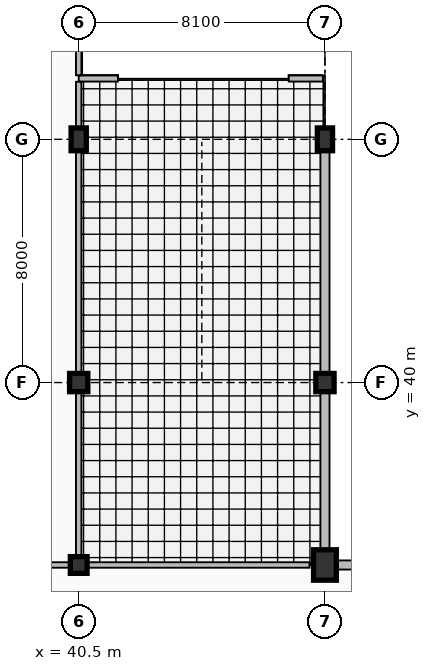
"""IFC4 building model, lengths in metres.
Left out: names, types, materials, properties, quantities, classifications, styles, units other than length and angle.
Written with IfcOpenShell. Run it as: python <this file> out.ifc"""

import sys

from ifc_helpers import new_model, si_unit, direction, frame, frame_2d, origin, origin_2d, place, context, subcontext, project, spatial, rectangle, extrude, element, fill, save


model = new_model("IFC4")
c1 = context("Model", 3, precision=1e-05, world=origin(), true_north=direction((0.0, 1.0)))
c2 = subcontext(c1, "Body", "Model", "MODEL_VIEW")
j1 = project(units=[si_unit("LENGTHUNIT", "METRE"), si_unit("PLANEANGLEUNIT", "RADIAN")], contexts=[c1])
p1 = place(None, origin())
s1 = spatial("IfcSite", under=j1, at=p1, CompositionType="ELEMENT")
p2 = place(p1, origin())
s2 = spatial("IfcBuilding", under=s1, at=p2, CompositionType="ELEMENT")
p3 = place(p2, frame((0.0, 0.0, 10.2)))
s3 = spatial("IfcBuildingStorey", under=s2, at=p3, CompositionType="ELEMENT", Elevation=10.2)
p4 = place(p3, frame((40.5, 34.0, 0.0), z_axis=(0.0, 0.0, 1.0), x_axis=(1.0, 0.0, 0.0)))
e1 = element("IfcColumn", 1, at=p4, inside=s3, PredefinedType="COLUMN", context=c2, shape_type="SweptSolid", body=[
    extrude(rectangle(XDim=0.55, YDim=0.55, at=origin_2d()), origin(), (0.0, 0.0, 1.0), 4.24),
])
p5 = place(p3, frame((40.5, 40.0, 0.0), z_axis=(0.0, 0.0, 1.0), x_axis=(1.0, 0.0, 0.0)))
e2 = element("IfcColumn", 2, at=p5, inside=s3, PredefinedType="COLUMN", context=c2, shape_type="SweptSolid", body=[
    extrude(rectangle(XDim=0.6, YDim=0.6, at=origin_2d()), origin(), (0.0, 0.0, 1.0), 4.5),
])
p6 = place(p3, frame((40.5, 48.0, 0.0), z_axis=(0.0, 0.0, 1.0), x_axis=(1.0, 0.0, 0.0)))
e3 = element("IfcColumn", 3, at=p6, inside=s3, PredefinedType="COLUMN", context=c2, shape_type="SweptSolid", body=[
    extrude(rectangle(XDim=0.5, YDim=0.75, at=origin_2d()), origin(), (0.0, 0.0, 1.0), 4.5),
])
p7 = place(p3, frame((48.6, 34.0, 0.0), z_axis=(0.0, 0.0, 1.0), x_axis=(1.0, 0.0, 0.0)))
e4 = element("IfcColumn", 4, at=p7, inside=s3, PredefinedType="COLUMN", context=c2, shape_type="SweptSolid", body=[
    extrude(rectangle(XDim=0.75, YDim=1.0, at=origin_2d()), origin(), (0.0, 0.0, 1.0), 4.5),
])
p8 = place(p3, frame((48.6, 40.0, 0.0), z_axis=(0.0, 0.0, 1.0), x_axis=(1.0, 0.0, 0.0)))
e5 = element("IfcColumn", 5, at=p8, inside=s3, PredefinedType="COLUMN", context=c2, shape_type="SweptSolid", body=[
    extrude(rectangle(XDim=0.6, YDim=0.6, at=origin_2d()), origin(), (0.0, 0.0, 1.0), 4.5),
])
p9 = place(p3, frame((48.6, 48.0, 0.0), z_axis=(0.0, 0.0, 1.0), x_axis=(1.0, 0.0, 0.0)))
e6 = element("IfcColumn", 6, at=p9, inside=s3, PredefinedType="COLUMN", context=c2, shape_type="SweptSolid", body=[
    extrude(rectangle(XDim=0.5, YDim=0.75, at=origin_2d()), origin(), (0.0, 0.0, 1.0), 4.5),
])
p10 = place(p3, frame((64.8, 34.0, 0.0), z_axis=(0.0, 0.0, 1.0), x_axis=(-1.0, 0.0, 0.0)))
e7 = element("IfcWall", 7, at=p10, inside=s3, PredefinedType="SOLIDWALL", context=c2, shape_type="SweptSolid", body=[
    extrude(rectangle(XDim=16.2, YDim=0.3, at=frame_2d((8.1, 0.0))), origin(), (0.0, 0.0, 1.0), 3.62),
])
p11 = place(p3, frame((48.6, 34.0, 0.0), z_axis=(0.0, 0.0, 1.0), x_axis=(0.0, 1.0, 0.0)))
e8 = element("IfcWall", 8, at=p11, inside=s3, PredefinedType="SOLIDWALL", context=c2, shape_type="SweptSolid", body=[
    extrude(rectangle(XDim=13.82, YDim=0.3, at=frame_2d((6.91, 0.0))), origin(), (0.0, 0.0, 1.0), 3.732),
])
p12 = place(p11, frame((7.65, 0.0, 0.95)))
e9 = element("IfcOpeningElement", 9, at=p12, cuts=e8, PredefinedType="OPENING", context=c2, shape_type="SweptSolid", body=[
    extrude(rectangle(XDim=3.15, YDim=1.6, at=frame_2d((1.575, 0.8))), frame((0.0, 0.16, 0.0), z_axis=(0.0, -1.0, 0.0), x_axis=(1.0, 0.0, 0.0)), (0.0, 0.0, 1.0), 0.32),
])
p13 = place(p3, frame((36.2, 34.0, 0.0), z_axis=(0.0, 0.0, 1.0), x_axis=(1.0, 0.0, 0.0)))
e10 = element("IfcWall", 10, at=p13, inside=s3, PredefinedType="PARTITIONING", context=c2, shape_type="SweptSolid", body=[
    extrude(rectangle(XDim=4.017, YDim=0.18, at=frame_2d((2.009, 0.0))), origin(), (0.0, 0.0, 1.0), 3.544),
])
p14 = place(p13, frame((1.408, 0.0, 0.0)))
e11 = element("IfcOpeningElement", 11, at=p14, cuts=e10, PredefinedType="OPENING", context=c2, shape_type="SweptSolid", body=[
    extrude(rectangle(XDim=1.2, YDim=2.2, at=frame_2d((0.6, 1.1))), frame((0.0, 0.1, 0.0), z_axis=(0.0, -1.0, 0.0), x_axis=(1.0, 0.0, 0.0)), (0.0, 0.0, 1.0), 0.2),
])
p15 = place(p3, frame((40.783, 34.0, 0.0), z_axis=(0.0, 0.0, 1.0), x_axis=(1.0, 0.0, 0.0)))
e12 = element("IfcWall", 12, at=p15, inside=s3, PredefinedType="PARTITIONING", context=c2, shape_type="SweptSolid", body=[
    extrude(rectangle(XDim=7.309, YDim=0.18, at=frame_2d((3.655, 0.0))), origin(), (0.0, 0.0, 1.0), 3.544),
])
p16 = place(p3, frame((40.5, 50.0, 0.0), z_axis=(0.0, 0.0, 1.0), x_axis=(1.0, 0.0, 0.0)))
e13 = element("IfcWall", 13, at=p16, inside=s3, PredefinedType="PARTITIONING", context=c2, shape_type="SweptSolid", body=[
    extrude(rectangle(XDim=1.29, YDim=0.2, at=frame_2d((0.645, 0.0))), origin(), (0.0, 0.0, 1.0), 4.24),
])
p17 = place(p3, frame((47.41, 50.0, 0.0), z_axis=(0.0, 0.0, 1.0), x_axis=(1.0, 0.0, 0.0)))
e14 = element("IfcWall", 14, at=p17, inside=s3, PredefinedType="PARTITIONING", context=c2, shape_type="SweptSolid", body=[
    extrude(rectangle(XDim=1.125, YDim=0.2, at=frame_2d((0.562, 0.0))), origin(), (0.0, 0.0, 1.0), 4.24),
])
p18 = place(p3, frame((40.5, 34.283, 0.0), z_axis=(0.0, 0.0, 1.0), x_axis=(0.0, 1.0, 0.0)))
e15 = element("IfcWall", 15, at=p18, inside=s3, PredefinedType="PARTITIONING", context=c2, shape_type="SweptSolid", body=[
    extrude(rectangle(XDim=5.409, YDim=0.18, at=frame_2d((2.705, 0.0))), origin(), (0.0, 0.0, 1.0), 3.769),
])
p19 = place(p3, frame((40.5, 40.308, 0.0), z_axis=(0.0, 0.0, 1.0), x_axis=(0.0, 1.0, 0.0)))
e16 = element("IfcWall", 16, at=p19, inside=s3, PredefinedType="PARTITIONING", context=c2, shape_type="SweptSolid", body=[
    extrude(rectangle(XDim=7.309, YDim=0.18, at=frame_2d((3.654, 0.0))), origin(), (0.0, 0.0, 1.0), 3.732),
])
p20 = place(p19, frame((3.104, 0.0, 0.0)))
e17 = element("IfcOpeningElement", 17, at=p20, cuts=e16, PredefinedType="OPENING", context=c2, shape_type="SweptSolid", body=[
    extrude(rectangle(XDim=1.1, YDim=2.2, at=frame_2d((0.55, 1.1))), frame((0.0, 0.1, 0.0), z_axis=(0.0, -1.0, 0.0), x_axis=(1.0, 0.0, 0.0)), (0.0, 0.0, 1.0), 0.2),
])
p21 = place(p3, frame((40.5, 48.383, 0.0), z_axis=(0.0, 0.0, 1.0), x_axis=(0.0, 1.0, 0.0)))
e18 = element("IfcWall", 18, at=p21, inside=s3, PredefinedType="PARTITIONING", context=c2, shape_type="SweptSolid", body=[
    extrude(rectangle(XDim=1.509, YDim=0.18, at=frame_2d((0.754, 0.0))), origin(), (0.0, 0.0, 1.0), 3.769),
])
p22 = place(p3, frame((40.5, 50.108, 0.0), z_axis=(0.0, 0.0, 1.0), x_axis=(0.0, 1.0, 0.0)))
e19 = element("IfcWall", 19, at=p22, inside=s3, PredefinedType="PARTITIONING", context=c2, shape_type="SweptSolid", body=[
    extrude(rectangle(XDim=5.534, YDim=0.18, at=frame_2d((2.767, 0.0))), origin(), (0.0, 0.0, 1.0), 3.769),
])
p23 = place(p12, origin())
e20 = element("IfcWindow", 20, at=p23, inside=s3, PartitioningType="TRIPLE_PANEL_VERTICAL", PredefinedType="WINDOW", context=c2, shape_type="SweptSolid", body=[
    extrude(rectangle(XDim=3.15, YDim=1.6, at=frame_2d((1.575, 0.8))), frame((0.0, 0.03, 0.0), z_axis=(0.0, -1.0, 0.0), x_axis=(1.0, 0.0, 0.0)), (0.0, 0.0, 1.0), 0.06),
])
fill(e9, e20)
p24 = place(p20, frame((1.1, 0.0, 0.0), z_axis=(0.0, 0.0, 1.0), x_axis=(-1.0, 0.0, 0.0)))
e21 = element("IfcDoor", 21, at=p24, inside=s3, OperationType="SINGLE_SWING_LEFT", PredefinedType="DOOR", context=c2, shape_type="SweptSolid", body=[
    extrude(rectangle(XDim=1.1, YDim=2.2, at=frame_2d((0.55, 1.1))), frame((0.0, 0.025, 0.0), z_axis=(0.0, -1.0, 0.0), x_axis=(1.0, 0.0, 0.0)), (0.0, 0.0, 1.0), 0.05),
])
fill(e17, e21)
save(model, sys.argv[1])
